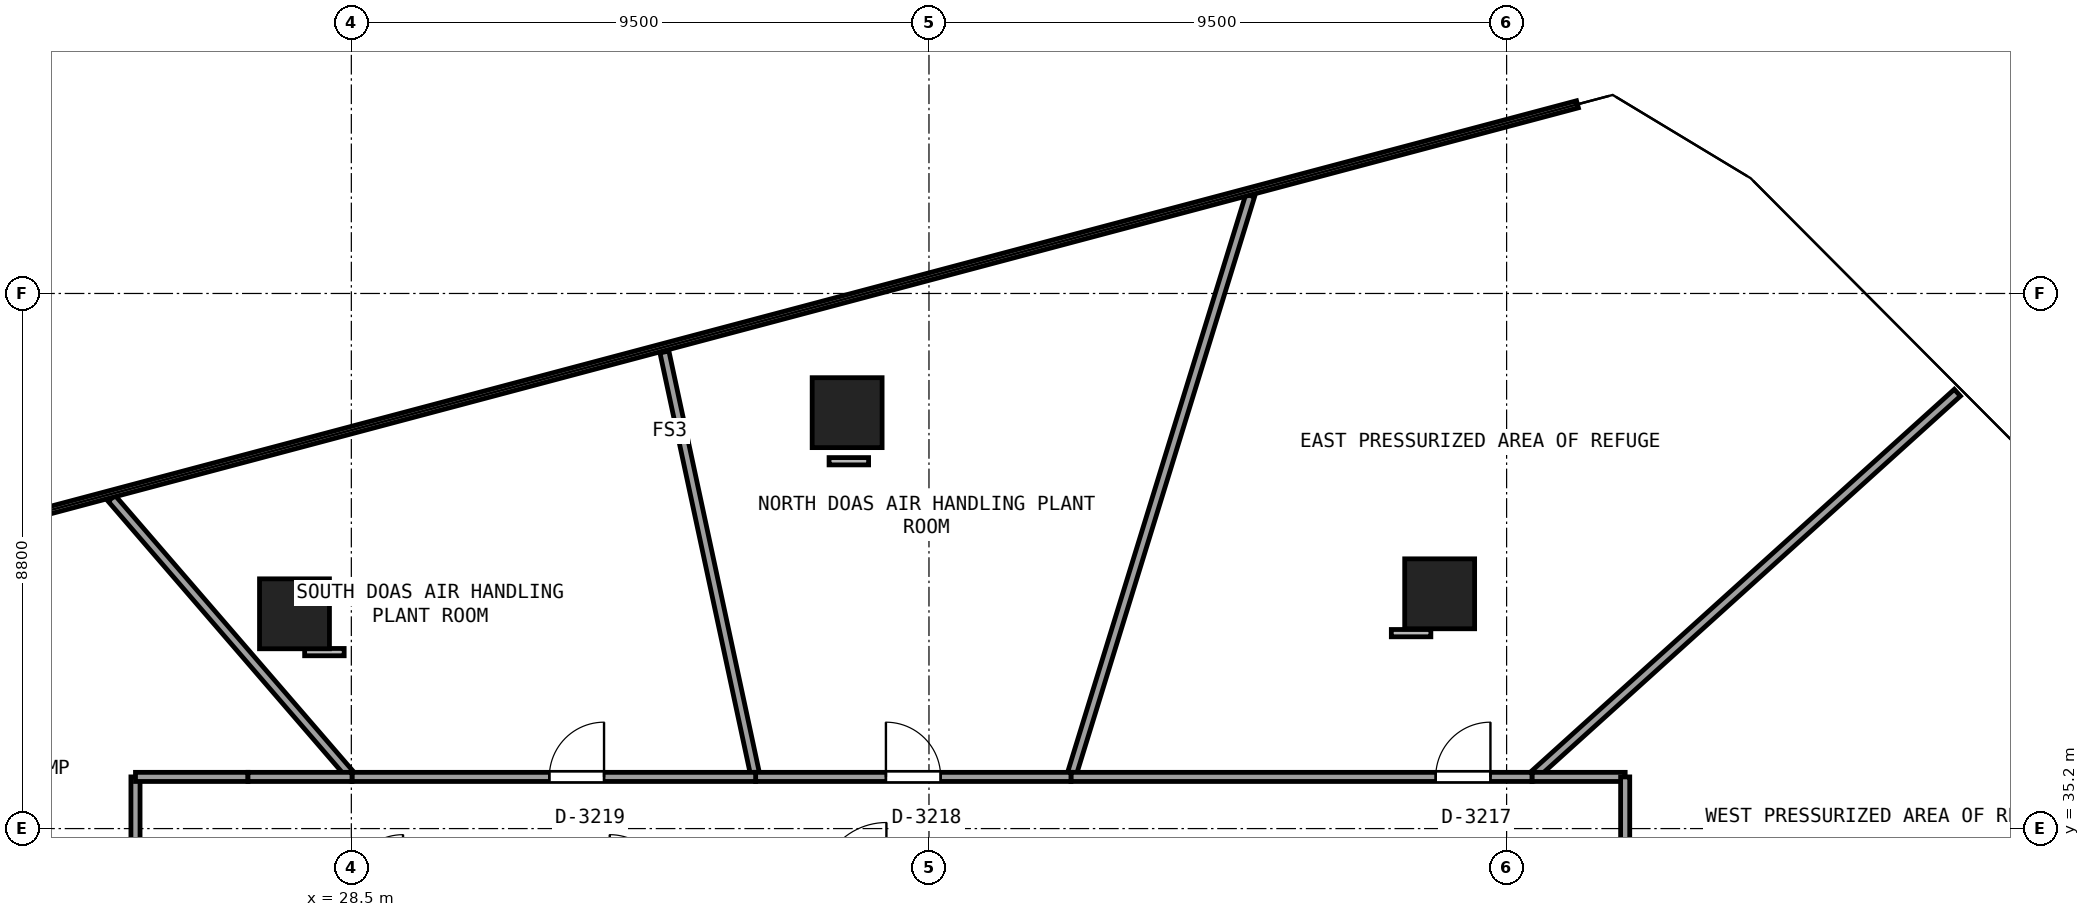
"""IFC4 building model, lengths in metres.
Left out: names, types, materials, properties, quantities, classifications, styles, units other than length and angle.
Written with IfcOpenShell. Run it as: python <this file> out.ifc"""

import sys

from ifc_helpers import new_model, si_unit, direction, frame, frame_2d, origin, origin_2d, place, context, subcontext, project, spatial, rectangle, extrude, element, fill, save


model = new_model("IFC4")
c1 = context("Model", 3, precision=1e-05, world=origin(), true_north=direction((0.0, 1.0)))
c2 = subcontext(c1, "Body", "Model", "MODEL_VIEW")
j1 = project(units=[si_unit("LENGTHUNIT", "METRE"), si_unit("PLANEANGLEUNIT", "RADIAN")], contexts=[c1])
p1 = place(None, origin())
s1 = spatial("IfcSite", under=j1, at=p1, CompositionType="ELEMENT")
p2 = place(p1, origin())
s2 = spatial("IfcBuilding", under=s1, at=p2, CompositionType="ELEMENT")
p3 = place(p2, frame((0.0, 0.0, 121.2)))
s3 = spatial("IfcBuildingStorey", under=s2, at=p3, CompositionType="ELEMENT", Elevation=121.2)
for number, where, z_axis, x_axis in (
    (1, (46.399, 39.061, 0.0), (0.0, 0.0, 1.0), (1.0, 0.0, 0.0)),
    (2, (36.654, 42.04, 0.0), (0.0, 0.0, 1.0), (1.0, 0.0, 0.0)),
    (3, (27.565, 38.732, 0.0), (0.0, 0.0, 1.0), (1.0, 0.0, 0.0)),
):
    element("IfcColumn", number, at=place(p3, frame(where, z_axis=z_axis, x_axis=x_axis)), inside=s3, PredefinedType="COLUMN", context=c2, shape_type="SweptSolid", body=[
        extrude(rectangle(XDim=1.15, YDim=1.15, at=origin_2d()), origin(), (0.0, 0.0, 1.0), 4.08),
    ])
p4 = place(p3, frame((54.913, 42.368, 0.0), z_axis=(0.0, 0.0, 1.0), x_axis=(-0.742164975515, -0.670217240242, 0.0)))
e4 = element("IfcWall", 4, at=p4, inside=s3, PredefinedType="PARTITIONING", context=c2, shape_type="SweptSolid", body=[
    extrude(rectangle(XDim=9.427, YDim=0.15, at=frame_2d((4.713, 0.0))), origin(), (0.0, 0.0, 1.0), 3.365),
])
p5 = place(p3, frame((47.917, 36.05, 0.0), z_axis=(0.0, 0.0, 1.0), x_axis=(1.0, 0.0, 0.0)))
e5 = element("IfcWall", 5, at=p5, inside=s3, PredefinedType="PARTITIONING", context=c2, shape_type="SweptSolid", body=[
    extrude(rectangle(XDim=1.533, YDim=0.15, at=frame_2d((0.767, 0.0))), origin(), (0.0, 0.0, 1.0), 3.365),
])
p6 = place(p3, frame((49.45, 36.05, 0.0), z_axis=(0.0, 0.0, 1.0), x_axis=(0.0, -1.0, 0.0)))
e6 = element("IfcWall", 6, at=p6, inside=s3, PredefinedType="PARTITIONING", context=c2, shape_type="SweptSolid", body=[
    extrude(rectangle(XDim=1.85, YDim=0.15, at=frame_2d((0.925, 0.0))), origin(), (0.0, 0.0, 1.0), 3.365),
])
p7 = place(p3, frame((43.283, 45.611, 0.0), z_axis=(0.0, 0.0, 1.0), x_axis=(-0.294646502068, -0.955606319998, 0.0)))
e7 = element("IfcWall", 7, at=p7, inside=s3, PredefinedType="PARTITIONING", context=c2, shape_type="SweptSolid", body=[
    extrude(rectangle(XDim=10.005, YDim=0.15, at=frame_2d((5.002, 0.0))), origin(), (0.0, 0.0, 1.0), 3.365),
])
p8 = place(p3, frame((40.335, 36.05, 0.0), z_axis=(0.0, 0.0, 1.0), x_axis=(1.0, 0.0, 0.0)))
e8 = element("IfcWall", 8, at=p8, inside=s3, PredefinedType="PARTITIONING", context=c2, shape_type="SweptSolid", body=[
    extrude(rectangle(XDim=7.582, YDim=0.15, at=frame_2d((3.791, 0.0))), origin(), (0.0, 0.0, 1.0), 3.065),
])
p9 = place(p8, frame((5.999, 0.0, 0.0)))
e9 = element("IfcOpeningElement", 9, at=p9, cuts=e8, PredefinedType="OPENING", context=c2, shape_type="SweptSolid", body=[
    extrude(rectangle(XDim=0.9, YDim=2.0, at=frame_2d((0.45, 1.0))), frame((0.0, 0.085, 0.0), z_axis=(0.0, -1.0, 0.0), x_axis=(1.0, 0.0, 0.0)), (0.0, 0.0, 1.0), 0.17),
])
p10 = place(p3, frame((33.649, 43.038, 0.0), z_axis=(0.0, 0.0, 1.0), x_axis=(0.209871997411, -0.977728870752, 0.0)))
e10 = element("IfcWall", 10, at=p10, inside=s3, PredefinedType="PARTITIONING", context=c2, shape_type="SweptSolid", body=[
    extrude(rectangle(XDim=7.147, YDim=0.15, at=frame_2d((3.574, 0.0))), origin(), (0.0, 0.0, 1.0), 3.365),
])
p11 = place(p3, frame((35.149, 36.05, 0.0), z_axis=(0.0, 0.0, 1.0), x_axis=(1.0, 0.0, 0.0)))
e11 = element("IfcWall", 11, at=p11, inside=s3, PredefinedType="PARTITIONING", context=c2, shape_type="SweptSolid", body=[
    extrude(rectangle(XDim=5.186, YDim=0.15, at=frame_2d((2.593, 0.0))), origin(), (0.0, 0.0, 1.0), 3.065),
])
p12 = place(p11, frame((2.143, 0.0, 0.0)))
e12 = element("IfcOpeningElement", 12, at=p12, cuts=e11, PredefinedType="OPENING", context=c2, shape_type="SweptSolid", body=[
    extrude(rectangle(XDim=0.9, YDim=2.0, at=frame_2d((0.45, 1.0))), frame((0.0, 0.085, 0.0), z_axis=(0.0, -1.0, 0.0), x_axis=(1.0, 0.0, 0.0)), (0.0, 0.0, 1.0), 0.17),
])
p13 = place(p3, frame((24.557, 40.631, 0.0), z_axis=(0.0, 0.0, 1.0), x_axis=(0.653405569298, -0.75700803299, 0.0)))
e13 = element("IfcWall", 13, at=p13, inside=s3, PredefinedType="PARTITIONING", context=c2, shape_type="SweptSolid", body=[
    extrude(rectangle(XDim=6.052, YDim=0.15, at=frame_2d((3.026, 0.0))), origin(), (0.0, 0.0, 1.0), 3.365),
])
p14 = place(p3, frame((28.511, 36.05, 0.0), z_axis=(0.0, 0.0, 1.0), x_axis=(1.0, 0.0, 0.0)))
e14 = element("IfcWall", 14, at=p14, inside=s3, PredefinedType="PARTITIONING", context=c2, shape_type="SweptSolid", body=[
    extrude(rectangle(XDim=6.638, YDim=0.15, at=frame_2d((3.319, 0.0))), origin(), (0.0, 0.0, 1.0), 3.065),
])
p15 = place(p14, frame((3.245, 0.0, 0.0)))
e15 = element("IfcOpeningElement", 15, at=p15, cuts=e14, PredefinedType="OPENING", context=c2, shape_type="SweptSolid", body=[
    extrude(rectangle(XDim=0.9, YDim=2.0, at=frame_2d((0.45, 1.0))), frame((0.0, 0.085, 0.0), z_axis=(0.0, -1.0, 0.0), x_axis=(1.0, 0.0, 0.0)), (0.0, 0.0, 1.0), 0.17),
])
p16 = place(p3, frame((24.95, 30.38, 0.0), z_axis=(0.0, 0.0, 1.0), x_axis=(0.0, 1.0, 0.0)))
e16 = element("IfcWall", 16, at=p16, inside=s3, PredefinedType="PARTITIONING", context=c2, shape_type="SweptSolid", body=[
    extrude(rectangle(XDim=5.67, YDim=0.15, at=frame_2d((2.835, 0.0))), origin(), (0.0, 0.0, 1.0), 3.365),
])
p17 = place(p3, frame((24.95, 36.05, 0.0), z_axis=(0.0, 0.0, 1.0), x_axis=(1.0, 0.0, 0.0)))
e17 = element("IfcWall", 17, at=p17, inside=s3, PredefinedType="PARTITIONING", context=c2, shape_type="SweptSolid", body=[
    extrude(rectangle(XDim=1.85, YDim=0.15, at=frame_2d((0.925, 0.0))), origin(), (0.0, 0.0, 1.0), 3.365),
])
p18 = place(p3, frame((26.8, 36.05, 0.0), z_axis=(0.0, 0.0, 1.0), x_axis=(1.0, 0.0, 0.0)))
e18 = element("IfcWall", 18, at=p18, inside=s3, PredefinedType="PARTITIONING", context=c2, shape_type="SweptSolid", body=[
    extrude(rectangle(XDim=1.711, YDim=0.15, at=frame_2d((0.855, 0.0))), origin(), (0.0, 0.0, 1.0), 4.08),
])
p19 = place(p9, origin())
e19 = element("IfcDoor", 19, at=p19, inside=s3, OperationType="SINGLE_SWING_RIGHT", PredefinedType="DOOR", context=c2, shape_type="SweptSolid", body=[
    extrude(rectangle(XDim=0.9, YDim=2.0, at=frame_2d((0.45, 1.0))), frame((0.0, 0.025, 0.0), z_axis=(0.0, -1.0, 0.0), x_axis=(1.0, 0.0, 0.0)), (0.0, 0.0, 1.0), 0.05),
])
fill(e9, e19)
p20 = place(p12, origin())
e20 = element("IfcDoor", 20, at=p20, inside=s3, OperationType="SINGLE_SWING_LEFT", PredefinedType="DOOR", context=c2, shape_type="SweptSolid", body=[
    extrude(rectangle(XDim=0.9, YDim=2.0, at=frame_2d((0.45, 1.0))), frame((0.0, 0.025, 0.0), z_axis=(0.0, -1.0, 0.0), x_axis=(1.0, 0.0, 0.0)), (0.0, 0.0, 1.0), 0.05),
])
fill(e12, e20)
p21 = place(p15, origin())
e21 = element("IfcDoor", 21, at=p21, inside=s3, OperationType="SINGLE_SWING_RIGHT", PredefinedType="DOOR", context=c2, shape_type="SweptSolid", body=[
    extrude(rectangle(XDim=0.9, YDim=2.0, at=frame_2d((0.45, 1.0))), frame((0.0, 0.025, 0.0), z_axis=(0.0, -1.0, 0.0), x_axis=(1.0, 0.0, 0.0)), (0.0, 0.0, 1.0), 0.05),
])
fill(e15, e21)
save(model, sys.argv[1])
